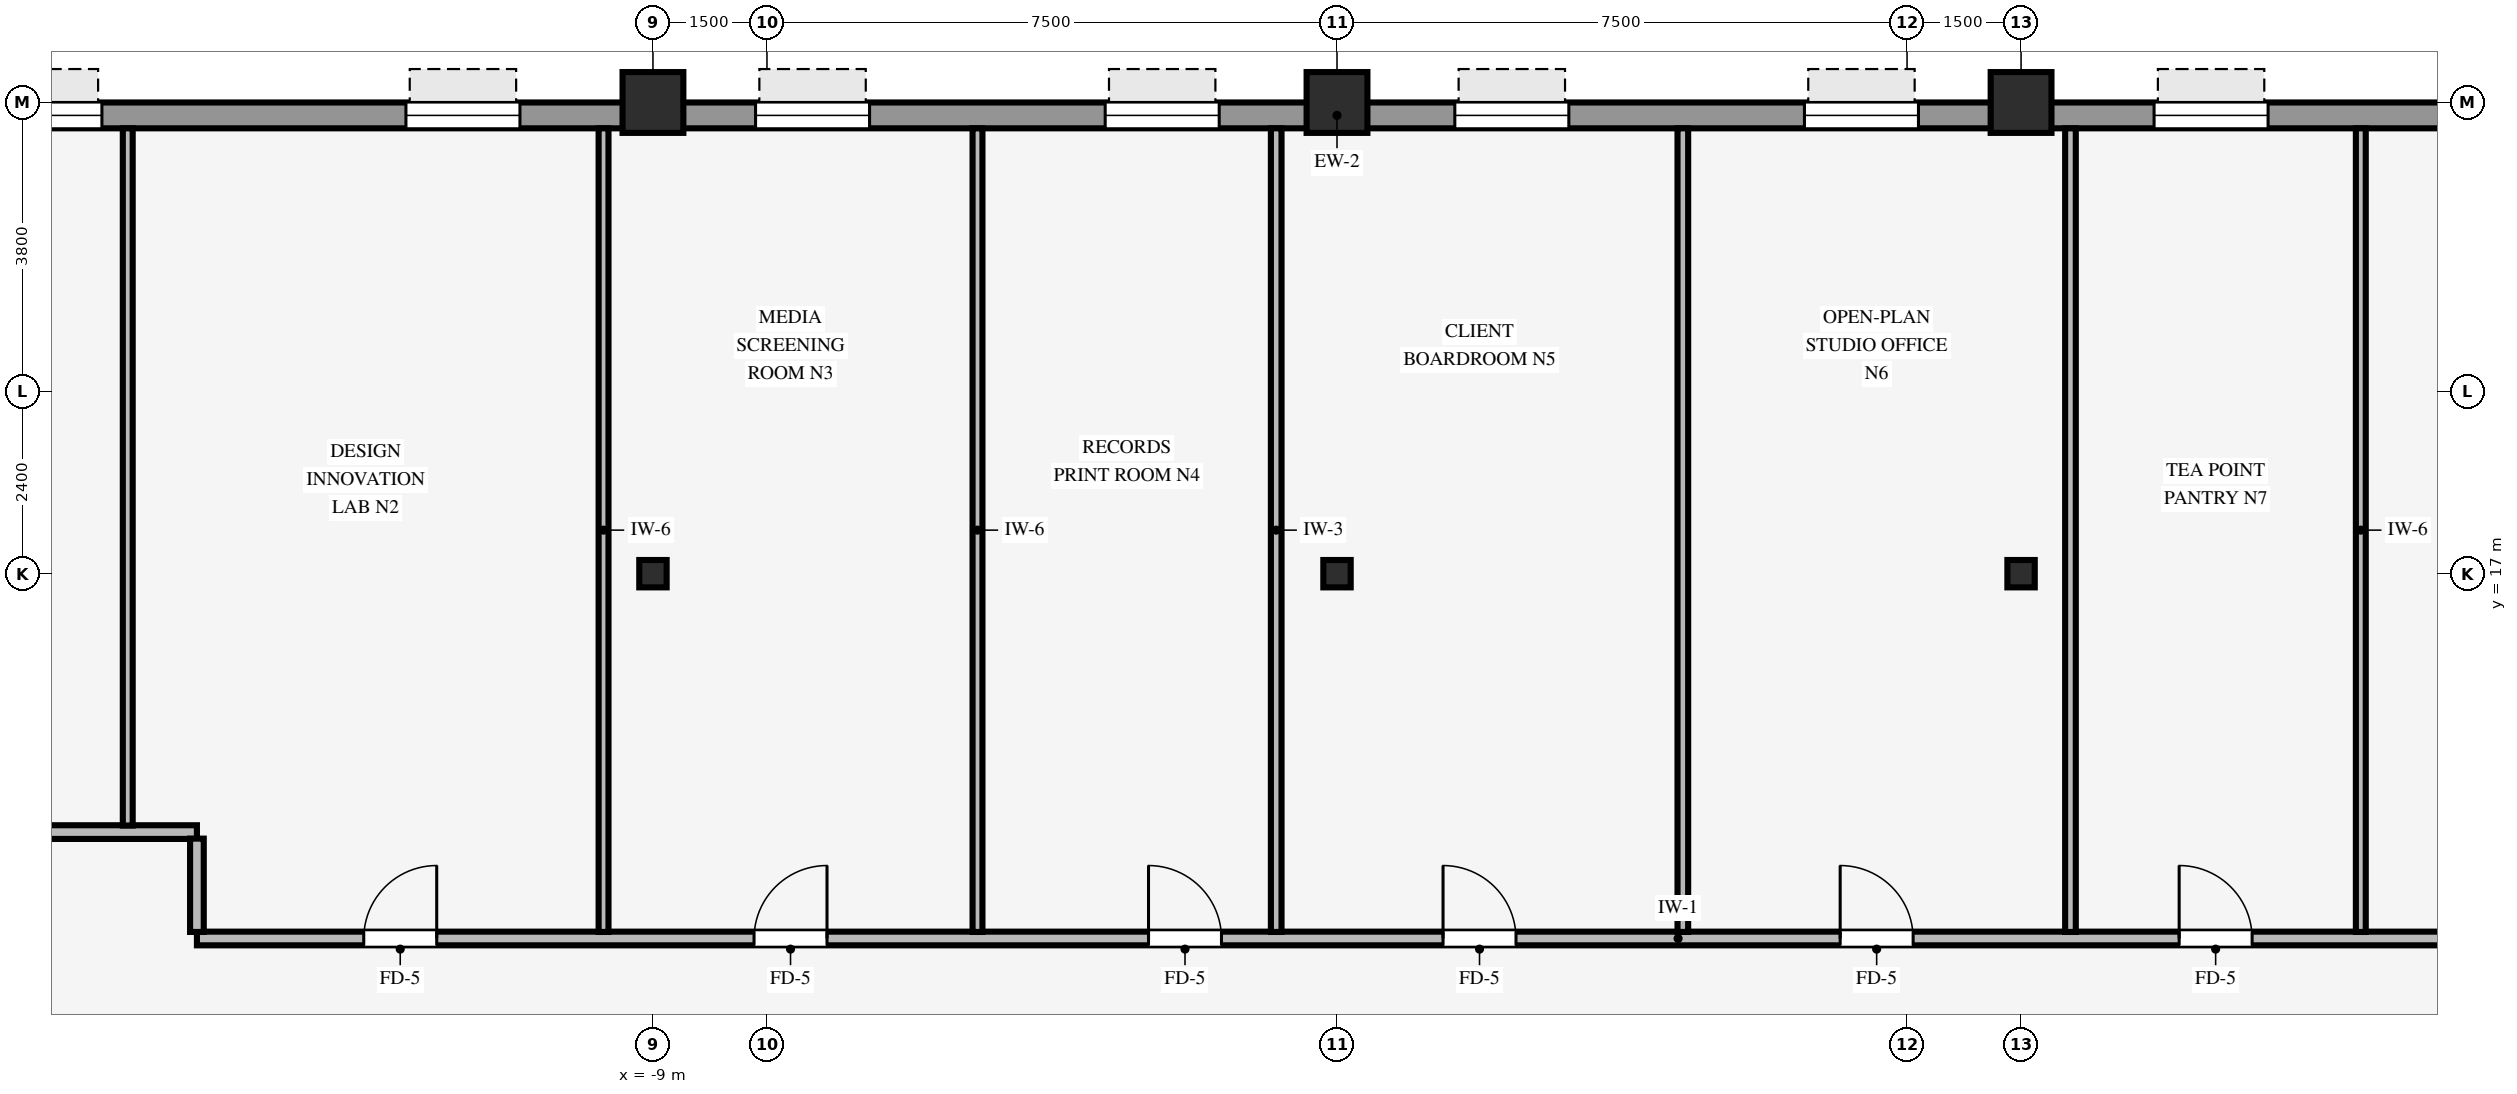
"""IFC4 building model, lengths in metres.
Left out: names, types, materials, properties, quantities, classifications, styles, units other than length and angle.
Written with IfcOpenShell. Run it as: python <this file> out.ifc"""

import sys

from ifc_helpers import new_model, si_unit, direction, frame, frame_2d, origin, origin_2d, place, context, subcontext, project, spatial, rectangle, hollow_rectangle, i_section, extrude, source, transform, mapped, element, fill, save


model = new_model("IFC4")
c1 = context("Model", 3, precision=1e-05, world=origin(), true_north=direction((0.0, 1.0)))
c2 = subcontext(c1, "Body", "Model", "MODEL_VIEW")
j1 = project(units=[si_unit("LENGTHUNIT", "METRE"), si_unit("PLANEANGLEUNIT", "RADIAN")], contexts=[c1])
p1 = place(None, origin())
s1 = spatial("IfcSite", under=j1, at=p1, CompositionType="ELEMENT")
p2 = place(p1, origin())
s2 = spatial("IfcBuilding", under=s1, at=p2, CompositionType="ELEMENT")
p3 = place(p2, frame((0.0, 0.0, 60.45)))
s3 = spatial("IfcBuildingStorey", under=s2, at=p3, CompositionType="ELEMENT", Elevation=60.45)
for number, where, z_axis, x_axis in (
    (1, (-9.0, 23.2, 0.0), (0.0, 0.0, 1.0), (1.0, 0.0, 0.0)),
    (2, (0.0, 23.2, 0.0), (0.0, 0.0, 1.0), (1.0, 0.0, 0.0)),
    (3, (9.0, 23.2, 0.0), (0.0, 0.0, 1.0), (1.0, 0.0, 0.0)),
):
    element("IfcColumn", number, at=place(p3, frame(where, z_axis=z_axis, x_axis=x_axis)), inside=s3, PredefinedType="COLUMN", context=c2, shape_type="SweptSolid", body=[
        extrude(hollow_rectangle(XDim=0.8, YDim=0.8, WallThickness=0.055, InnerFilletRadius=0.055, OuterFilletRadius=0.11, at=origin_2d()), origin(), (0.0, 0.0, 1.0), 3.37),
    ])
for number, where, z_axis, x_axis in (
    (4, (0.0, 17.0, 0.0), (0.0, 0.0, 1.0), (1.0, 0.0, 0.0)),
    (5, (-9.0, 17.0, 0.0), (0.0, 0.0, 1.0), (1.0, 0.0, 0.0)),
    (6, (9.0, 17.0, 0.0), (0.0, 0.0, 1.0), (1.0, 0.0, 0.0)),
):
    element("IfcColumn", number, at=place(p3, frame(where, z_axis=z_axis, x_axis=x_axis)), inside=s3, PredefinedType="COLUMN", context=c2, shape_type="SweptSolid", body=[
        extrude(i_section(OverallWidth=0.36, OverallDepth=0.36, WebThickness=0.021, FlangeThickness=0.021, FilletRadius=0.018, at=origin_2d()), origin(), (0.0, 0.0, 1.0), 3.37),
    ])
p4 = place(p3, frame((-19.4, 23.03, 0.0), z_axis=(0.0, 0.0, 1.0), x_axis=(1.0, 0.0, 0.0)))
e7 = element("IfcWall", 7, at=p4, inside=s3, PredefinedType="STANDARD", context=c2, shape_type="SweptSolid", body=[
    extrude(rectangle(XDim=38.8, YDim=0.34, at=frame_2d((19.4, 0.0))), origin(), (0.0, 0.0, 1.0), 2.705),
])
p5 = place(p4, frame((1.65, 0.0, 0.8)))
e8 = element("IfcOpeningElement", 8, at=p5, cuts=e7, PredefinedType="OPENING", context=c2, shape_type="SweptSolid", body=[
    extrude(rectangle(XDim=1.5, YDim=1.6, at=frame_2d((0.75, 0.8))), frame((0.0, 0.18, 0.0), z_axis=(0.0, -1.0, 0.0), x_axis=(1.0, 0.0, 0.0)), (0.0, 0.0, 1.0), 0.36),
])
p6 = place(p4, frame((7.15, 0.0, 0.8)))
e9 = element("IfcOpeningElement", 9, at=p6, cuts=e7, PredefinedType="OPENING", context=c2, shape_type="SweptSolid", body=[
    extrude(rectangle(XDim=1.5, YDim=1.6, at=frame_2d((0.75, 0.8))), frame((0.0, 0.18, 0.0), z_axis=(0.0, -1.0, 0.0), x_axis=(1.0, 0.0, 0.0)), (0.0, 0.0, 1.0), 0.36),
])
p7 = place(p4, frame((11.75, 0.0, 0.8)))
e10 = element("IfcOpeningElement", 10, at=p7, cuts=e7, PredefinedType="OPENING", context=c2, shape_type="SweptSolid", body=[
    extrude(rectangle(XDim=1.5, YDim=1.6, at=frame_2d((0.75, 0.8))), frame((0.0, 0.18, 0.0), z_axis=(0.0, -1.0, 0.0), x_axis=(1.0, 0.0, 0.0)), (0.0, 0.0, 1.0), 0.36),
])
p8 = place(p4, frame((16.35, 0.0, 0.8)))
e11 = element("IfcOpeningElement", 11, at=p8, cuts=e7, PredefinedType="OPENING", context=c2, shape_type="SweptSolid", body=[
    extrude(rectangle(XDim=1.5, YDim=1.6, at=frame_2d((0.75, 0.8))), frame((0.0, 0.18, 0.0), z_axis=(0.0, -1.0, 0.0), x_axis=(1.0, 0.0, 0.0)), (0.0, 0.0, 1.0), 0.36),
])
p9 = place(p4, frame((20.95, 0.0, 0.8)))
e12 = element("IfcOpeningElement", 12, at=p9, cuts=e7, PredefinedType="OPENING", context=c2, shape_type="SweptSolid", body=[
    extrude(rectangle(XDim=1.5, YDim=1.6, at=frame_2d((0.75, 0.8))), frame((0.0, 0.18, 0.0), z_axis=(0.0, -1.0, 0.0), x_axis=(1.0, 0.0, 0.0)), (0.0, 0.0, 1.0), 0.36),
])
p10 = place(p4, frame((25.55, 0.0, 0.8)))
e13 = element("IfcOpeningElement", 13, at=p10, cuts=e7, PredefinedType="OPENING", context=c2, shape_type="SweptSolid", body=[
    extrude(rectangle(XDim=1.5, YDim=1.6, at=frame_2d((0.75, 0.8))), frame((0.0, 0.18, 0.0), z_axis=(0.0, -1.0, 0.0), x_axis=(1.0, 0.0, 0.0)), (0.0, 0.0, 1.0), 0.36),
])
p11 = place(p4, frame((30.15, 0.0, 0.8)))
e14 = element("IfcOpeningElement", 14, at=p11, cuts=e7, PredefinedType="OPENING", context=c2, shape_type="SweptSolid", body=[
    extrude(rectangle(XDim=1.5, YDim=1.6, at=frame_2d((0.75, 0.8))), frame((0.0, 0.18, 0.0), z_axis=(0.0, -1.0, 0.0), x_axis=(1.0, 0.0, 0.0)), (0.0, 0.0, 1.0), 0.36),
])
p12 = place(p4, frame((34.75, 0.0, 0.8)))
e15 = element("IfcOpeningElement", 15, at=p12, cuts=e7, PredefinedType="OPENING", context=c2, shape_type="SweptSolid", body=[
    extrude(rectangle(XDim=1.5, YDim=1.6, at=frame_2d((0.75, 0.8))), frame((0.0, 0.18, 0.0), z_axis=(0.0, -1.0, 0.0), x_axis=(1.0, 0.0, 0.0)), (0.0, 0.0, 1.0), 0.36),
])
p13 = place(p3, frame((-15.0, 12.2, 0.0), z_axis=(0.0, 0.0, 1.0), x_axis=(1.0, 0.0, 0.0)))
e16 = element("IfcWall", 16, at=p13, inside=s3, PredefinedType="PARTITIONING", context=c2, shape_type="SweptSolid", body=[
    extrude(rectangle(XDim=30.0, YDim=0.18, at=frame_2d((15.0, 0.0))), origin(), (0.0, 0.0, 1.0), 3.36),
])
p14 = place(p13, frame((2.195, 0.0, 0.0)))
e17 = element("IfcOpeningElement", 17, at=p14, cuts=e16, PredefinedType="OPENING", context=c2, shape_type="SweptSolid", body=[
    extrude(rectangle(XDim=0.96, YDim=2.1, at=frame_2d((0.48, 1.05))), frame((0.0, 0.1, 0.0), z_axis=(0.0, -1.0, 0.0), x_axis=(1.0, 0.0, 0.0)), (0.0, 0.0, 1.0), 0.2),
])
p15 = place(p13, frame((16.395, 0.0, 0.0)))
e18 = element("IfcOpeningElement", 18, at=p15, cuts=e16, PredefinedType="OPENING", context=c2, shape_type="SweptSolid", body=[
    extrude(rectangle(XDim=0.96, YDim=2.1, at=frame_2d((0.48, 1.05))), frame((0.0, 0.1, 0.0), z_axis=(0.0, -1.0, 0.0), x_axis=(1.0, 0.0, 0.0)), (0.0, 0.0, 1.0), 0.2),
])
p16 = place(p13, frame((21.62, 0.0, 0.0)))
e19 = element("IfcOpeningElement", 19, at=p16, cuts=e16, PredefinedType="OPENING", context=c2, shape_type="SweptSolid", body=[
    extrude(rectangle(XDim=0.96, YDim=2.1, at=frame_2d((0.48, 1.05))), frame((0.0, 0.1, 0.0), z_axis=(0.0, -1.0, 0.0), x_axis=(1.0, 0.0, 0.0)), (0.0, 0.0, 1.0), 0.2),
])
p17 = place(p13, frame((7.33, 0.0, 0.0)))
e20 = element("IfcOpeningElement", 20, at=p17, cuts=e16, PredefinedType="OPENING", context=c2, shape_type="SweptSolid", body=[
    extrude(rectangle(XDim=0.96, YDim=2.1, at=frame_2d((0.48, 1.05))), frame((0.0, 0.1, 0.0), z_axis=(0.0, -1.0, 0.0), x_axis=(1.0, 0.0, 0.0)), (0.0, 0.0, 1.0), 0.2),
])
p18 = place(p13, frame((26.08, 0.0, 0.0)))
e21 = element("IfcOpeningElement", 21, at=p18, cuts=e16, PredefinedType="OPENING", context=c2, shape_type="SweptSolid", body=[
    extrude(rectangle(XDim=0.96, YDim=2.1, at=frame_2d((0.48, 1.05))), frame((0.0, 0.1, 0.0), z_axis=(0.0, -1.0, 0.0), x_axis=(1.0, 0.0, 0.0)), (0.0, 0.0, 1.0), 0.2),
])
p19 = place(p13, frame((12.52, 0.0, 0.0)))
e22 = element("IfcOpeningElement", 22, at=p19, cuts=e16, PredefinedType="OPENING", context=c2, shape_type="SweptSolid", body=[
    extrude(rectangle(XDim=0.96, YDim=2.1, at=frame_2d((0.48, 1.05))), frame((0.0, 0.1, 0.0), z_axis=(0.0, -1.0, 0.0), x_axis=(1.0, 0.0, 0.0)), (0.0, 0.0, 1.0), 0.2),
])
p20 = place(p3, frame((-20.5, 13.6, 0.0), z_axis=(0.0, 0.0, 1.0), x_axis=(1.0, 0.0, 0.0)))
e23 = element("IfcWall", 23, at=p20, inside=s3, PredefinedType="PARTITIONING", context=c2, shape_type="SweptSolid", body=[
    extrude(rectangle(XDim=5.5, YDim=0.18, at=frame_2d((2.75, 0.0))), origin(), (0.0, 0.0, 1.0), 2.942),
])
p21 = place(p20, frame((1.815, 0.0, 0.0)))
e24 = element("IfcOpeningElement", 24, at=p21, cuts=e23, PredefinedType="OPENING", context=c2, shape_type="SweptSolid", body=[
    extrude(rectangle(XDim=0.96, YDim=2.1, at=frame_2d((0.48, 1.05))), frame((0.0, 0.1, 0.0), z_axis=(0.0, -1.0, 0.0), x_axis=(1.0, 0.0, 0.0)), (0.0, 0.0, 1.0), 0.2),
])
p22 = place(p3, frame((-15.91, 13.686, 0.0), z_axis=(0.0, 0.0, 1.0), x_axis=(0.0, 1.0, 0.0)))
e25 = element("IfcWall", 25, at=p22, inside=s3, PredefinedType="PARTITIONING", context=c2, shape_type="SweptSolid", body=[
    extrude(rectangle(XDim=9.174, YDim=0.13, at=frame_2d((4.587, 0.0))), origin(), (0.0, 0.0, 1.0), 3.36),
])
p23 = place(p3, frame((-15.0, 12.286, 0.0), z_axis=(0.0, 0.0, 1.0), x_axis=(0.0, 1.0, 0.0)))
e26 = element("IfcWall", 26, at=p23, inside=s3, PredefinedType="PARTITIONING", context=c2, shape_type="SweptSolid", body=[
    extrude(rectangle(XDim=1.228, YDim=0.18, at=frame_2d((0.614, 0.0))), origin(), (0.0, 0.0, 1.0), 3.36),
])
for number, where, z_axis, x_axis in (
    (27, (-9.65, 12.286, 0.0), (0.0, 0.0, 1.0), (0.0, 1.0, 0.0)),
    (28, (-4.73, 12.286, 0.0), (0.0, 0.0, 1.0), (0.0, 1.0, 0.0)),
):
    element("IfcWall", number, at=place(p3, frame(where, z_axis=z_axis, x_axis=x_axis)), inside=s3, PredefinedType="PARTITIONING", context=c2, shape_type="SweptSolid", body=[
        extrude(rectangle(XDim=10.574, YDim=0.13, at=frame_2d((5.287, 0.0))), origin(), (0.0, 0.0, 1.0), 3.36),
    ])
for number, where, z_axis, x_axis in (
    (29, (-0.8, 12.286, 0.0), (0.0, 0.0, 1.0), (0.0, 1.0, 0.0)),
    (30, (4.55, 12.286, 0.0), (0.0, 0.0, 1.0), (0.0, 1.0, 0.0)),
    (31, (9.65, 12.286, 0.0), (0.0, 0.0, 1.0), (0.0, 1.0, 0.0)),
):
    element("IfcWall", number, at=place(p3, frame(where, z_axis=z_axis, x_axis=x_axis)), inside=s3, PredefinedType="PARTITIONING", context=c2, shape_type="SweptSolid", body=[
        extrude(rectangle(XDim=10.574, YDim=0.14, at=frame_2d((5.287, 0.0))), origin(), (0.0, 0.0, 1.0), 3.36),
    ])
p24 = place(p3, frame((13.47, 12.286, 0.0), z_axis=(0.0, 0.0, 1.0), x_axis=(0.0, 1.0, 0.0)))
e32 = element("IfcWall", 32, at=p24, inside=s3, PredefinedType="PARTITIONING", context=c2, shape_type="SweptSolid", body=[
    extrude(rectangle(XDim=10.574, YDim=0.13, at=frame_2d((5.287, 0.0))), origin(), (0.0, 0.0, 1.0), 3.36),
])
m1 = source(origin(), c2, "Body", "SweptSolid", [
    extrude(rectangle(XDim=1.5, YDim=1.6, at=frame_2d((0.75, 0.8))), frame((0.0, 0.03, 0.0), z_axis=(0.0, -1.0, 0.0), x_axis=(1.0, 0.0, 0.0)), (0.0, 0.0, 1.0), 0.06),
])
p25 = place(p5, origin())
e33 = element("IfcWindow", 33, at=p25, inside=s3, PartitioningType="SINGLE_PANEL", PredefinedType="WINDOW", context=c2, shape_type="MappedRepresentation", body=[
    mapped(m1, transform((0.0, 0.0, 0.0), scale=1.0)),
])
fill(e8, e33)
p26 = place(p6, origin())
e34 = element("IfcWindow", 34, at=p26, inside=s3, PartitioningType="SINGLE_PANEL", PredefinedType="WINDOW", context=c2, shape_type="MappedRepresentation", body=[
    mapped(m1, transform((0.0, 0.0, 0.0), scale=1.0)),
])
fill(e9, e34)
p27 = place(p7, origin())
e35 = element("IfcWindow", 35, at=p27, inside=s3, PartitioningType="SINGLE_PANEL", PredefinedType="WINDOW", context=c2, shape_type="MappedRepresentation", body=[
    mapped(m1, transform((0.0, 0.0, 0.0), scale=1.0)),
])
fill(e10, e35)
p28 = place(p8, origin())
e36 = element("IfcWindow", 36, at=p28, inside=s3, PartitioningType="SINGLE_PANEL", PredefinedType="WINDOW", context=c2, shape_type="MappedRepresentation", body=[
    mapped(m1, transform((0.0, 0.0, 0.0), scale=1.0)),
])
fill(e11, e36)
p29 = place(p9, origin())
e37 = element("IfcWindow", 37, at=p29, inside=s3, PartitioningType="SINGLE_PANEL", PredefinedType="WINDOW", context=c2, shape_type="MappedRepresentation", body=[
    mapped(m1, transform((0.0, 0.0, 0.0), scale=1.0)),
])
fill(e12, e37)
p30 = place(p10, origin())
e38 = element("IfcWindow", 38, at=p30, inside=s3, PartitioningType="SINGLE_PANEL", PredefinedType="WINDOW", context=c2, shape_type="MappedRepresentation", body=[
    mapped(m1, transform((0.0, 0.0, 0.0), scale=1.0)),
])
fill(e13, e38)
p31 = place(p11, origin())
e39 = element("IfcWindow", 39, at=p31, inside=s3, PartitioningType="SINGLE_PANEL", PredefinedType="WINDOW", context=c2, shape_type="MappedRepresentation", body=[
    mapped(m1, transform((0.0, 0.0, 0.0), scale=1.0)),
])
fill(e14, e39)
m2 = source(origin(), c2, "Body", "SweptSolid", [
    extrude(rectangle(XDim=0.96, YDim=2.1, at=frame_2d((0.48, 1.05))), frame((0.0, 0.025, 0.0), z_axis=(0.0, -1.0, 0.0), x_axis=(1.0, 0.0, 0.0)), (0.0, 0.0, 1.0), 0.05),
])
p32 = place(p14, origin())
e40 = element("IfcDoor", 40, at=p32, inside=s3, OperationType="SINGLE_SWING_RIGHT", PredefinedType="DOOR", context=c2, shape_type="MappedRepresentation", body=[
    mapped(m2, transform((0.0, 0.0, 0.0), scale=1.0)),
])
fill(e17, e40)
p33 = place(p15, origin())
e41 = element("IfcDoor", 41, at=p33, inside=s3, OperationType="SINGLE_SWING_LEFT", PredefinedType="DOOR", context=c2, shape_type="MappedRepresentation", body=[
    mapped(m2, transform((0.0, 0.0, 0.0), scale=1.0)),
])
fill(e18, e41)
p34 = place(p16, origin())
e42 = element("IfcDoor", 42, at=p34, inside=s3, OperationType="SINGLE_SWING_LEFT", PredefinedType="DOOR", context=c2, shape_type="MappedRepresentation", body=[
    mapped(m2, transform((0.0, 0.0, 0.0), scale=1.0)),
])
fill(e19, e42)
p35 = place(p17, origin())
e43 = element("IfcDoor", 43, at=p35, inside=s3, OperationType="SINGLE_SWING_RIGHT", PredefinedType="DOOR", context=c2, shape_type="MappedRepresentation", body=[
    mapped(m2, transform((0.0, 0.0, 0.0), scale=1.0)),
])
fill(e20, e43)
p36 = place(p18, origin())
e44 = element("IfcDoor", 44, at=p36, inside=s3, OperationType="SINGLE_SWING_LEFT", PredefinedType="DOOR", context=c2, shape_type="MappedRepresentation", body=[
    mapped(m2, transform((0.0, 0.0, 0.0), scale=1.0)),
])
fill(e21, e44)
p37 = place(p19, origin())
e45 = element("IfcDoor", 45, at=p37, inside=s3, OperationType="SINGLE_SWING_LEFT", PredefinedType="DOOR", context=c2, shape_type="MappedRepresentation", body=[
    mapped(m2, transform((0.0, 0.0, 0.0), scale=1.0)),
])
fill(e22, e45)
save(model, sys.argv[1])
